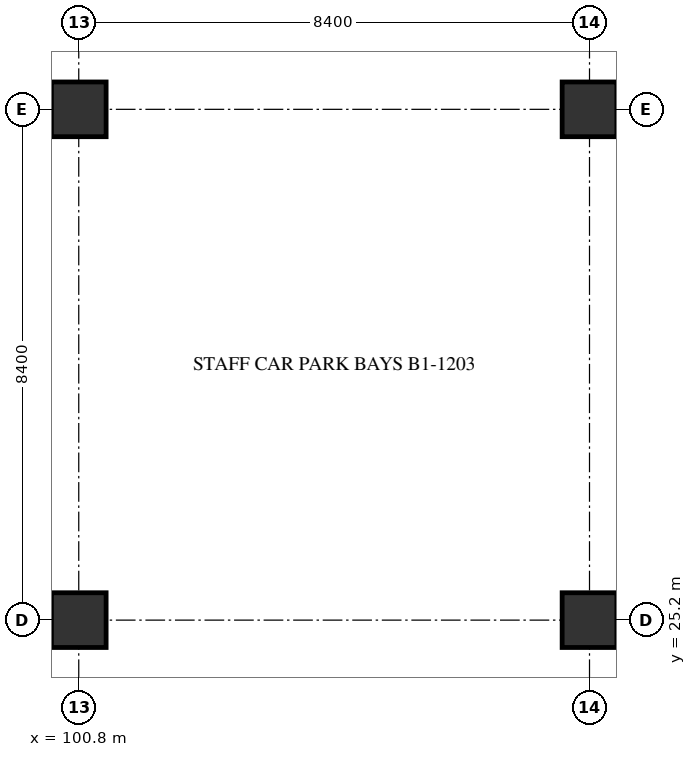
"""IFC4 building model, lengths in metres.
Left out: names, types, materials, properties, quantities, classifications, styles, units other than length and angle.
Written with IfcOpenShell. Run it as: python <this file> out.ifc"""

import sys

from ifc_helpers import new_model, si_unit, direction, frame, origin, origin_2d, place, context, subcontext, project, spatial, rectangle, extrude, element, save


model = new_model("IFC4")
c1 = context("Model", 3, precision=1e-05, world=origin(), true_north=direction((0.0, 1.0)))
c2 = subcontext(c1, "Body", "Model", "MODEL_VIEW")
j1 = project(units=[si_unit("LENGTHUNIT", "METRE"), si_unit("PLANEANGLEUNIT", "RADIAN")], contexts=[c1])
p1 = place(None, origin())
s1 = spatial("IfcSite", under=j1, at=p1, CompositionType="ELEMENT")
p2 = place(p1, origin())
s2 = spatial("IfcBuilding", under=s1, at=p2, CompositionType="ELEMENT")
p3 = place(p2, frame((0.0, 0.0, -5.4)))
s3 = spatial("IfcBuildingStorey", under=s2, at=p3, CompositionType="ELEMENT", Elevation=-5.4)
for number, where, z_axis, x_axis in (
    (1, (100.8, 25.2, 0.0), (0.0, 0.0, 1.0), (1.0, 0.0, 0.0)),
    (2, (100.8, 33.6, 0.0), (0.0, 0.0, 1.0), (1.0, 0.0, 0.0)),
    (3, (109.2, 25.2, 0.0), (0.0, 0.0, 1.0), (1.0, 0.0, 0.0)),
    (4, (109.2, 33.6, 0.0), (0.0, 0.0, 1.0), (1.0, 0.0, 0.0)),
):
    element("IfcColumn", number, at=place(p3, frame(where, z_axis=z_axis, x_axis=x_axis)), inside=s3, PredefinedType="COLUMN", context=c2, shape_type="SweptSolid", body=[
        extrude(rectangle(XDim=0.9, YDim=0.9, at=origin_2d()), origin(), (0.0, 0.0, 1.0), 5.4),
    ])
save(model, sys.argv[1])
